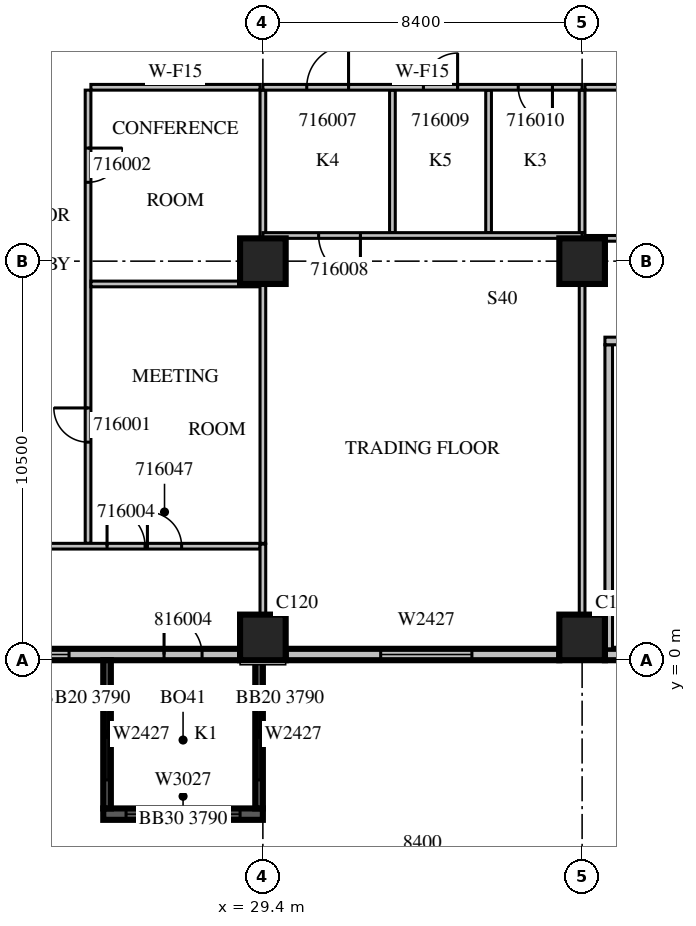
"""IFC4 building model, lengths in metres.
Left out: names, types, materials, properties, quantities, classifications, styles, units other than length and angle.
Written with IfcOpenShell. Run it as: python <this file> out.ifc"""

import sys

from ifc_helpers import new_model, si_unit, direction, frame, frame_2d, origin, origin_2d, place, context, subcontext, project, spatial, rectangle, extrude, source, transform, mapped, element, fill, save


model = new_model("IFC4")
c1 = context("Model", 3, precision=1e-05, world=origin(), true_north=direction((0.0, 1.0)))
c2 = subcontext(c1, "Body", "Model", "MODEL_VIEW")
j1 = project(units=[si_unit("LENGTHUNIT", "METRE"), si_unit("PLANEANGLEUNIT", "RADIAN")], contexts=[c1])
p1 = place(None, origin())
s1 = spatial("IfcSite", under=j1, at=p1, CompositionType="ELEMENT")
p2 = place(p1, origin())
s2 = spatial("IfcBuilding", under=s1, at=p2, CompositionType="ELEMENT")
p3 = place(p2, frame((0.0, 0.0, 78.3)))
s3 = spatial("IfcBuildingStorey", under=s2, at=p3, CompositionType="ELEMENT", Elevation=78.3)
m1 = source(origin(), c2, "Body", "SweptSolid", [
    extrude(rectangle(XDim=1.2, YDim=1.2, at=origin_2d()), origin(), (0.0, 0.0, 1.0), 4.2),
])
for number, where, z_axis, x_axis in (
    (1, (29.4, 0.6, 0.0), (0.0, 0.0, 1.0), (1.0, 0.0, 0.0)),
    (2, (37.8, 0.6, 0.0), (0.0, 0.0, 1.0), (1.0, 0.0, 0.0)),
    (3, (29.4, 10.5, 0.0), (0.0, 0.0, 1.0), (1.0, 0.0, 0.0)),
    (4, (37.8, 10.5, 0.0), (0.0, 0.0, 1.0), (1.0, 0.0, 0.0)),
):
    element("IfcColumn", number, at=place(p3, frame(where, z_axis=z_axis, x_axis=x_axis)), inside=s3, PredefinedType="COLUMN", context=c2, shape_type="MappedRepresentation", body=[
        mapped(m1, transform((0.0, 0.0, 0.0), scale=1.0)),
    ])
m2 = source(origin(), c2, "Body", "SweptSolid", [
    extrude(rectangle(XDim=7.2, YDim=0.3, at=frame_2d((3.6, 0.0))), origin(), (0.0, 0.0, 1.0), 3.8),
])
p4 = place(p3, frame((21.6, 0.15, 0.0), z_axis=(0.0, 0.0, 1.0), x_axis=(1.0, 0.0, 0.0)))
e5 = element("IfcWall", 5, at=p4, inside=s3, PredefinedType="STANDARD", context=c2, shape_type="MappedRepresentation", body=[
    mapped(m2, transform((0.0, 0.0, 0.0), scale=1.0)),
])
m3 = source(origin(), c2, "Body", "SweptSolid", [
    extrude(rectangle(XDim=2.4, YDim=2.7, at=frame_2d((1.2, 1.35))), frame((0.0, 0.16, 0.0), z_axis=(0.0, -1.0, 0.0), x_axis=(1.0, 0.0, 0.0)), (0.0, 0.0, 1.0), 0.32),
])
p5 = place(p4, frame((0.3, 0.0, 0.6)))
e6 = element("IfcOpeningElement", 6, at=p5, cuts=e5, PredefinedType="OPENING", context=c2, shape_type="MappedRepresentation", body=[
    mapped(m3, transform((0.0, 0.0, 0.0), scale=1.0)),
])
m4 = source(origin(), c2, "Body", "SweptSolid", [
    extrude(rectangle(XDim=1.0, YDim=2.1, at=frame_2d((0.5, 1.05))), frame((0.0, 0.16, 0.0), z_axis=(0.0, -1.0, 0.0), x_axis=(1.0, 0.0, 0.0)), (0.0, 0.0, 1.0), 0.32),
])
p6 = place(p4, frame((5.2, 0.0, 0.0)))
e7 = element("IfcOpeningElement", 7, at=p6, cuts=e5, PredefinedType="OPENING", context=c2, shape_type="MappedRepresentation", body=[
    mapped(m4, transform((0.0, 0.0, 0.0), scale=1.0)),
])
p7 = place(p3, frame((30.0, 0.15, 0.0), z_axis=(0.0, 0.0, 1.0), x_axis=(1.0, 0.0, 0.0)))
e8 = element("IfcWall", 8, at=p7, inside=s3, PredefinedType="STANDARD", context=c2, shape_type="MappedRepresentation", body=[
    mapped(m2, transform((0.0, 0.0, 0.0), scale=1.0)),
])
p8 = place(p7, frame((2.5, 0.0, 0.6)))
e9 = element("IfcOpeningElement", 9, at=p8, cuts=e8, PredefinedType="OPENING", context=c2, shape_type="MappedRepresentation", body=[
    mapped(m3, transform((0.0, 0.0, 0.0), scale=1.0)),
])
m5 = source(origin(), c2, "Body", "SweptSolid", [
    extrude(rectangle(XDim=1.8, YDim=0.3, at=frame_2d((0.9, 0.0))), origin(), (0.0, 0.0, 1.0), 3.8),
])
p9 = place(p3, frame((38.4, 0.15, 0.0), z_axis=(0.0, 0.0, 1.0), x_axis=(1.0, 0.0, 0.0)))
e10 = element("IfcWall", 10, at=p9, inside=s3, PredefinedType="STANDARD", context=c2, shape_type="MappedRepresentation", body=[
    mapped(m5, transform((0.0, 0.0, 0.0), scale=1.0)),
])
m6 = source(origin(), c2, "Body", "SweptSolid", [
    extrude(rectangle(XDim=4.2, YDim=0.3, at=frame_2d((2.1, 0.0))), origin(), (0.0, 0.0, 1.0), 3.79),
])
p10 = place(p3, frame((25.2, -4.05, 0.0), z_axis=(0.0, 0.0, 1.0), x_axis=(1.0, 0.0, 0.0)))
e11 = element("IfcWall", 11, at=p10, inside=s3, PredefinedType="SOLIDWALL", context=c2, shape_type="MappedRepresentation", body=[
    mapped(m6, transform((0.0, 0.0, 0.0), scale=1.0)),
])
m7 = source(origin(), c2, "Body", "SweptSolid", [
    extrude(rectangle(XDim=3.0, YDim=2.7, at=frame_2d((1.5, 1.35))), frame((0.0, 0.16, 0.0), z_axis=(0.0, -1.0, 0.0), x_axis=(1.0, 0.0, 0.0)), (0.0, 0.0, 1.0), 0.32),
])
p11 = place(p10, frame((0.6, 0.0, 0.6)))
e12 = element("IfcOpeningElement", 12, at=p11, cuts=e11, PredefinedType="OPENING", context=c2, shape_type="MappedRepresentation", body=[
    mapped(m7, transform((0.0, 0.0, 0.0), scale=1.0)),
])
m8 = source(origin(), c2, "Body", "SweptSolid", [
    extrude(rectangle(XDim=3.9, YDim=0.2, at=frame_2d((1.95, 0.0))), origin(), (0.0, 0.0, 1.0), 3.79),
])
p12 = place(p3, frame((25.3, 0.0, 0.0), z_axis=(0.0, 0.0, 1.0), x_axis=(0.0, -1.0, 0.0)))
e13 = element("IfcWall", 13, at=p12, inside=s3, PredefinedType="SOLIDWALL", context=c2, shape_type="MappedRepresentation", body=[
    mapped(m8, transform((0.0, 0.0, 0.0), scale=1.0)),
])
m9 = source(origin(), c2, "Body", "SweptSolid", [
    extrude(rectangle(XDim=2.4, YDim=2.7, at=frame_2d((1.2, 1.35))), frame((0.0, 0.11, 0.0), z_axis=(0.0, -1.0, 0.0), x_axis=(1.0, 0.0, 0.0)), (0.0, 0.0, 1.0), 0.22),
])
p13 = place(p12, frame((0.75, 0.0, 0.6)))
e14 = element("IfcOpeningElement", 14, at=p13, cuts=e13, PredefinedType="OPENING", context=c2, shape_type="MappedRepresentation", body=[
    mapped(m9, transform((0.0, 0.0, 0.0), scale=1.0)),
])
p14 = place(p3, frame((29.3, 0.0, 0.0), z_axis=(0.0, 0.0, 1.0), x_axis=(0.0, -1.0, 0.0)))
e15 = element("IfcWall", 15, at=p14, inside=s3, PredefinedType="SOLIDWALL", context=c2, shape_type="MappedRepresentation", body=[
    mapped(m8, transform((0.0, 0.0, 0.0), scale=1.0)),
])
p15 = place(p14, frame((0.75, 0.0, 0.6)))
e16 = element("IfcOpeningElement", 16, at=p15, cuts=e15, PredefinedType="OPENING", context=c2, shape_type="MappedRepresentation", body=[
    mapped(m9, transform((0.0, 0.0, 0.0), scale=1.0)),
])
m10 = source(origin(), c2, "Body", "SweptSolid", [
    extrude(rectangle(XDim=8.0, YDim=0.2, at=frame_2d((4.0, 0.0))), origin(), (0.0, 0.0, 1.0), 3.8),
])
p16 = place(p3, frame((38.5, 0.3, 0.0), z_axis=(0.0, 0.0, 1.0), x_axis=(0.0, 1.0, 0.0)))
e17 = element("IfcWall", 17, at=p16, inside=s3, PredefinedType="PARTITIONING", context=c2, shape_type="MappedRepresentation", body=[
    mapped(m10, transform((0.0, 0.0, 0.0), scale=1.0)),
])
m11 = source(origin(), c2, "Body", "SweptSolid", [
    extrude(rectangle(XDim=5.45, YDim=0.2, at=frame_2d((2.725, 0.0))), origin(), (0.0, 0.0, 1.0), 3.8),
])
p17 = place(p3, frame((38.4, 8.4, 0.0), z_axis=(0.0, 0.0, 1.0), x_axis=(1.0, 0.0, 0.0)))
e18 = element("IfcWall", 18, at=p17, inside=s3, PredefinedType="PARTITIONING", context=c2, shape_type="MappedRepresentation", body=[
    mapped(m11, transform((0.0, 0.0, 0.0), scale=1.0)),
])
m12 = source(origin(), c2, "Body", "SweptSolid", [
    extrude(rectangle(XDim=1.2, YDim=2.1, at=frame_2d((0.6, 1.05))), frame((0.0, 0.11, 0.0), z_axis=(0.0, -1.0, 0.0), x_axis=(1.0, 0.0, 0.0)), (0.0, 0.0, 1.0), 0.22),
])
p18 = place(p17, frame((0.4, 0.0, 0.0)))
e19 = element("IfcOpeningElement", 19, at=p18, cuts=e18, PredefinedType="OPENING", context=c2, shape_type="MappedRepresentation", body=[
    mapped(m12, transform((0.0, 0.0, 0.0), scale=1.0)),
])
m13 = source(origin(), c2, "Body", "SweptSolid", [
    extrude(rectangle(XDim=0.9, YDim=2.1, at=frame_2d((0.45, 1.05))), frame((0.0, 0.11, 0.0), z_axis=(0.0, -1.0, 0.0), x_axis=(1.0, 0.0, 0.0)), (0.0, 0.0, 1.0), 0.22),
])
p19 = place(p17, frame((3.25, 0.0, 0.0)))
e20 = element("IfcOpeningElement", 20, at=p19, cuts=e18, PredefinedType="OPENING", context=c2, shape_type="MappedRepresentation", body=[
    mapped(m13, transform((0.0, 0.0, 0.0), scale=1.0)),
])
m14 = source(origin(), c2, "Body", "SweptSolid", [
    extrude(rectangle(XDim=11.925, YDim=0.15, at=frame_2d((5.963, 0.0))), origin(), (0.0, 0.0, 1.0), 3.8),
])
p20 = place(p3, frame((24.8, 15.0, 0.0), z_axis=(0.0, 0.0, 1.0), x_axis=(0.0, -1.0, 0.0)))
e21 = element("IfcWall", 21, at=p20, inside=s3, PredefinedType="PARTITIONING", context=c2, shape_type="MappedRepresentation", body=[
    mapped(m14, transform((0.0, 0.0, 0.0), scale=1.0)),
])
m15 = source(origin(), c2, "Body", "SweptSolid", [
    extrude(rectangle(XDim=0.9, YDim=2.1, at=frame_2d((0.45, 1.05))), frame((0.0, 0.085, 0.0), z_axis=(0.0, -1.0, 0.0), x_axis=(1.0, 0.0, 0.0)), (0.0, 0.0, 1.0), 0.17),
])
p21 = place(p20, frame((8.363, 0.0, 0.0)))
e22 = element("IfcOpeningElement", 22, at=p21, cuts=e21, PredefinedType="OPENING", context=c2, shape_type="MappedRepresentation", body=[
    mapped(m15, transform((0.0, 0.0, 0.0), scale=1.0)),
])
p22 = place(p20, frame((1.525, 0.0, 0.0)))
e23 = element("IfcOpeningElement", 23, at=p22, cuts=e21, PredefinedType="OPENING", context=c2, shape_type="MappedRepresentation", body=[
    mapped(m15, transform((0.0, 0.0, 0.0), scale=1.0)),
])
m16 = source(origin(), c2, "Body", "SweptSolid", [
    extrude(rectangle(XDim=4.45, YDim=0.15, at=frame_2d((2.225, 0.0))), origin(), (0.0, 0.0, 1.0), 3.8),
])
for number, where, z_axis, x_axis in (
    (24, (29.325, 9.9, 0.0), (0.0, 0.0, 1.0), (-1.0, 0.0, 0.0)),
    (25, (29.325, 15.075, 0.0), (0.0, 0.0, 1.0), (-1.0, 0.0, 0.0)),
):
    element("IfcWall", number, at=place(p3, frame(where, z_axis=z_axis, x_axis=x_axis)), inside=s3, PredefinedType="PARTITIONING", context=c2, shape_type="MappedRepresentation", body=[
        mapped(m16, transform((0.0, 0.0, 0.0), scale=1.0)),
    ])
m17 = source(origin(), c2, "Body", "SweptSolid", [
    extrude(rectangle(XDim=6.826, YDim=0.15, at=frame_2d((3.413, 0.0))), origin(), (0.0, 0.0, 1.0), 3.8),
])
p23 = place(p3, frame((29.4, 3.075, 0.0), z_axis=(0.0, 0.0, 1.0), x_axis=(0.0, 1.0, 0.0)))
e26 = element("IfcWall", 26, at=p23, inside=s3, PredefinedType="PARTITIONING", context=c2, shape_type="MappedRepresentation", body=[
    mapped(m17, transform((0.0, 0.0, 0.0), scale=1.0)),
])
m18 = source(origin(), c2, "Body", "SweptSolid", [
    extrude(rectangle(XDim=3.901, YDim=0.15, at=frame_2d((1.95, 0.0))), origin(), (0.0, 0.0, 1.0), 3.8),
])
p24 = place(p3, frame((29.4, 11.099, 0.0), z_axis=(0.0, 0.0, 1.0), x_axis=(0.0, 1.0, 0.0)))
e27 = element("IfcWall", 27, at=p24, inside=s3, PredefinedType="PARTITIONING", context=c2, shape_type="MappedRepresentation", body=[
    mapped(m18, transform((0.0, 0.0, 0.0), scale=1.0)),
])
m19 = source(origin(), c2, "Body", "SweptSolid", [
    extrude(rectangle(XDim=7.125, YDim=0.15, at=frame_2d((3.562, 0.0))), origin(), (0.0, 0.0, 1.0), 3.8),
])
p25 = place(p3, frame((22.2, 3.0, 0.0), z_axis=(0.0, 0.0, 1.0), x_axis=(1.0, 0.0, 0.0)))
e28 = element("IfcWall", 28, at=p25, inside=s3, PredefinedType="PARTITIONING", context=c2, shape_type="MappedRepresentation", body=[
    mapped(m19, transform((0.0, 0.0, 0.0), scale=1.0)),
])
m20 = source(origin(), c2, "Body", "SweptSolid", [
    extrude(rectangle(XDim=1.0, YDim=2.1, at=frame_2d((0.5, 1.05))), frame((0.0, 0.085, 0.0), z_axis=(0.0, -1.0, 0.0), x_axis=(1.0, 0.0, 0.0)), (0.0, 0.0, 1.0), 0.17),
])
p26 = place(p25, frame((3.1, 0.0, 0.0)))
e29 = element("IfcOpeningElement", 29, at=p26, cuts=e28, PredefinedType="OPENING", context=c2, shape_type="MappedRepresentation", body=[
    mapped(m20, transform((0.0, 0.0, 0.0), scale=1.0)),
])
p27 = place(p25, frame((4.162, 0.0, 0.0)))
e30 = element("IfcOpeningElement", 30, at=p27, cuts=e28, PredefinedType="OPENING", context=c2, shape_type="MappedRepresentation", body=[
    mapped(m15, transform((0.0, 0.0, 0.0), scale=1.0)),
])
m21 = source(origin(), c2, "Body", "SweptSolid", [
    extrude(rectangle(XDim=6.45, YDim=0.15, at=frame_2d((3.225, 0.0))), origin(), (0.0, 0.0, 1.0), 3.8),
])
p28 = place(p3, frame((37.875, 11.1, 0.0), z_axis=(0.0, 0.0, 1.0), x_axis=(1.0, 0.0, 0.0)))
e31 = element("IfcWall", 31, at=p28, inside=s3, PredefinedType="PARTITIONING", context=c2, shape_type="MappedRepresentation", body=[
    mapped(m21, transform((0.0, 0.0, 0.0), scale=1.0)),
])
p29 = place(p3, frame((44.325, 15.075, 0.0), z_axis=(0.0, 0.0, 1.0), x_axis=(-1.0, 0.0, 0.0)))
e32 = element("IfcWall", 32, at=p29, inside=s3, PredefinedType="PARTITIONING", context=c2, shape_type="MappedRepresentation", body=[
    mapped(m21, transform((0.0, 0.0, 0.0), scale=1.0)),
])
p30 = place(p29, frame((2.812, 0.0, 0.0)))
e33 = element("IfcOpeningElement", 33, at=p30, cuts=e32, PredefinedType="OPENING", context=c2, shape_type="MappedRepresentation", body=[
    mapped(m15, transform((0.0, 0.0, 0.0), scale=1.0)),
])
m22 = source(origin(), c2, "Body", "SweptSolid", [
    extrude(rectangle(XDim=3.75, YDim=0.15, at=frame_2d((1.875, 0.0))), origin(), (0.0, 0.0, 1.0), 3.8),
])
for number, where, z_axis, x_axis in (
    (34, (32.809, 11.25, 0.0), (0.0, 0.0, 1.0), (0.0, 1.0, 0.0)),
    (35, (35.339, 11.25, 0.0), (0.0, 0.0, 1.0), (0.0, 1.0, 0.0)),
):
    element("IfcWall", number, at=place(p3, frame(where, z_axis=z_axis, x_axis=x_axis)), inside=s3, PredefinedType="PARTITIONING", context=c2, shape_type="MappedRepresentation", body=[
        mapped(m22, transform((0.0, 0.0, 0.0), scale=1.0)),
    ])
m23 = source(origin(), c2, "Body", "SweptSolid", [
    extrude(rectangle(XDim=1.856, YDim=0.15, at=frame_2d((0.928, 0.0))), origin(), (0.0, 0.0, 1.0), 3.8),
])
p31 = place(p3, frame((29.4, 1.199, 0.0), z_axis=(0.0, 0.0, 1.0), x_axis=(0.0, 1.0, 0.0)))
e36 = element("IfcWall", 36, at=p31, inside=s3, PredefinedType="PARTITIONING", context=c2, shape_type="MappedRepresentation", body=[
    mapped(m23, transform((0.0, 0.0, 0.0), scale=1.0)),
])
m24 = source(origin(), c2, "Body", "SweptSolid", [
    extrude(rectangle(XDim=8.702, YDim=0.15, at=frame_2d((4.351, 0.0))), origin(), (0.0, 0.0, 1.0), 3.8),
])
p32 = place(p3, frame((37.8, 1.199, 0.0), z_axis=(0.0, 0.0, 1.0), x_axis=(0.0, 1.0, 0.0)))
e37 = element("IfcWall", 37, at=p32, inside=s3, PredefinedType="PARTITIONING", context=c2, shape_type="MappedRepresentation", body=[
    mapped(m24, transform((0.0, 0.0, 0.0), scale=1.0)),
])
p33 = place(p3, frame((37.8, 11.25, 0.0), z_axis=(0.0, 0.0, 1.0), x_axis=(0.0, 1.0, 0.0)))
e38 = element("IfcWall", 38, at=p33, inside=s3, PredefinedType="PARTITIONING", context=c2, shape_type="MappedRepresentation", body=[
    mapped(m22, transform((0.0, 0.0, 0.0), scale=1.0)),
])
m25 = source(origin(), c2, "Body", "SweptSolid", [
    extrude(rectangle(XDim=8.4, YDim=0.15, at=frame_2d((4.2, 0.0))), origin(), (0.0, 0.0, 1.0), 3.8),
])
p34 = place(p3, frame((37.8, 11.175, 0.0), z_axis=(0.0, 0.0, 1.0), x_axis=(-1.0, 0.0, 0.0)))
e39 = element("IfcWall", 39, at=p34, inside=s3, PredefinedType="PARTITIONING", context=c2, shape_type="MappedRepresentation", body=[
    mapped(m25, transform((0.0, 0.0, 0.0), scale=1.0)),
])
m26 = source(origin(), c2, "Body", "SweptSolid", [
    extrude(rectangle(XDim=1.1, YDim=2.1, at=frame_2d((0.55, 1.05))), frame((0.0, 0.085, 0.0), z_axis=(0.0, -1.0, 0.0), x_axis=(1.0, 0.0, 0.0)), (0.0, 0.0, 1.0), 0.17),
])
p35 = place(p34, frame((5.833, 0.0, 0.0)))
e40 = element("IfcOpeningElement", 40, at=p35, cuts=e39, PredefinedType="OPENING", context=c2, shape_type="MappedRepresentation", body=[
    mapped(m26, transform((0.0, 0.0, 0.0), scale=1.0)),
])
p36 = place(p3, frame((37.8, 15.075, 0.0), z_axis=(0.0, 0.0, 1.0), x_axis=(-1.0, 0.0, 0.0)))
e41 = element("IfcWall", 41, at=p36, inside=s3, PredefinedType="PARTITIONING", context=c2, shape_type="MappedRepresentation", body=[
    mapped(m25, transform((0.0, 0.0, 0.0), scale=1.0)),
])
p37 = place(p36, frame((6.146, 0.0, 0.0)))
e42 = element("IfcOpeningElement", 42, at=p37, cuts=e41, PredefinedType="OPENING", context=c2, shape_type="MappedRepresentation", body=[
    mapped(m26, transform((0.0, 0.0, 0.0), scale=1.0)),
])
p38 = place(p36, frame((3.276, 0.0, 0.0)))
e43 = element("IfcOpeningElement", 43, at=p38, cuts=e41, PredefinedType="OPENING", context=c2, shape_type="MappedRepresentation", body=[
    mapped(m15, transform((0.0, 0.0, 0.0), scale=1.0)),
])
p39 = place(p36, frame((0.781, 0.0, 0.0)))
e44 = element("IfcOpeningElement", 44, at=p39, cuts=e41, PredefinedType="OPENING", context=c2, shape_type="MappedRepresentation", body=[
    mapped(m15, transform((0.0, 0.0, 0.0), scale=1.0)),
])
m27 = source(origin(), c2, "Body", "SweptSolid", [
    extrude(rectangle(XDim=2.4, YDim=2.7, at=frame_2d((1.2, 1.35))), frame((0.0, 0.03, 0.0), z_axis=(0.0, -1.0, 0.0), x_axis=(1.0, 0.0, 0.0)), (0.0, 0.0, 1.0), 0.06),
])
p40 = place(p5, origin())
e45 = element("IfcWindow", 45, at=p40, inside=s3, PartitioningType="SINGLE_PANEL", PredefinedType="WINDOW", context=c2, shape_type="MappedRepresentation", body=[
    mapped(m27, transform((0.0, 0.0, 0.0), scale=1.0)),
])
fill(e6, e45)
p41 = place(p8, origin())
e46 = element("IfcWindow", 46, at=p41, inside=s3, PartitioningType="SINGLE_PANEL", PredefinedType="WINDOW", context=c2, shape_type="MappedRepresentation", body=[
    mapped(m27, transform((0.0, 0.0, 0.0), scale=1.0)),
])
fill(e9, e46)
m28 = source(origin(), c2, "Body", "SweptSolid", [
    extrude(rectangle(XDim=3.0, YDim=2.7, at=frame_2d((1.5, 1.35))), frame((0.0, 0.03, 0.0), z_axis=(0.0, -1.0, 0.0), x_axis=(1.0, 0.0, 0.0)), (0.0, 0.0, 1.0), 0.06),
])
p42 = place(p11, origin())
e47 = element("IfcWindow", 47, at=p42, inside=s3, PartitioningType="SINGLE_PANEL", PredefinedType="WINDOW", context=c2, shape_type="MappedRepresentation", body=[
    mapped(m28, transform((0.0, 0.0, 0.0), scale=1.0)),
])
fill(e12, e47)
p43 = place(p13, origin())
e48 = element("IfcWindow", 48, at=p43, inside=s3, PartitioningType="SINGLE_PANEL", PredefinedType="WINDOW", context=c2, shape_type="MappedRepresentation", body=[
    mapped(m27, transform((0.0, 0.0, 0.0), scale=1.0)),
])
fill(e14, e48)
p44 = place(p15, origin())
e49 = element("IfcWindow", 49, at=p44, inside=s3, PartitioningType="SINGLE_PANEL", PredefinedType="WINDOW", context=c2, shape_type="MappedRepresentation", body=[
    mapped(m27, transform((0.0, 0.0, 0.0), scale=1.0)),
])
fill(e16, e49)
m29 = source(origin(), c2, "Body", "SweptSolid", [
    extrude(rectangle(XDim=0.9, YDim=2.1, at=frame_2d((0.45, 1.05))), frame((0.0, 0.025, 0.0), z_axis=(0.0, -1.0, 0.0), x_axis=(1.0, 0.0, 0.0)), (0.0, 0.0, 1.0), 0.05),
])
p45 = place(p21, origin())
e50 = element("IfcDoor", 50, at=p45, inside=s3, OperationType="SINGLE_SWING_RIGHT", PredefinedType="DOOR", context=c2, shape_type="MappedRepresentation", body=[
    mapped(m29, transform((0.0, 0.0, 0.0), scale=1.0)),
])
fill(e22, e50)
p46 = place(p22, origin())
e51 = element("IfcDoor", 51, at=p46, inside=s3, OperationType="SINGLE_SWING_LEFT", PredefinedType="DOOR", context=c2, shape_type="MappedRepresentation", body=[
    mapped(m29, transform((0.0, 0.0, 0.0), scale=1.0)),
])
fill(e23, e51)
m30 = source(origin(), c2, "Body", "SweptSolid", [
    extrude(rectangle(XDim=1.0, YDim=2.1, at=frame_2d((0.5, 1.05))), frame((0.0, 0.025, 0.0), z_axis=(0.0, -1.0, 0.0), x_axis=(1.0, 0.0, 0.0)), (0.0, 0.0, 1.0), 0.05),
])
p47 = place(p26, origin())
e52 = element("IfcDoor", 52, at=p47, inside=s3, OperationType="SINGLE_SWING_LEFT", PredefinedType="DOOR", context=c2, shape_type="MappedRepresentation", body=[
    mapped(m30, transform((0.0, 0.0, 0.0), scale=1.0)),
])
fill(e29, e52)
m31 = source(origin(), c2, "Body", "SweptSolid", [
    extrude(rectangle(XDim=1.1, YDim=2.1, at=frame_2d((0.55, 1.05))), frame((0.0, 0.025, 0.0), z_axis=(0.0, -1.0, 0.0), x_axis=(1.0, 0.0, 0.0)), (0.0, 0.0, 1.0), 0.05),
])
p48 = place(p37, origin())
e53 = element("IfcDoor", 53, at=p48, inside=s3, OperationType="SINGLE_SWING_RIGHT", PredefinedType="DOOR", context=c2, shape_type="MappedRepresentation", body=[
    mapped(m31, transform((0.0, 0.0, 0.0), scale=1.0)),
])
fill(e42, e53)
p49 = place(p35, origin())
e54 = element("IfcDoor", 54, at=p49, inside=s3, OperationType="SINGLE_SWING_LEFT", PredefinedType="DOOR", context=c2, shape_type="MappedRepresentation", body=[
    mapped(m31, transform((0.0, 0.0, 0.0), scale=1.0)),
])
fill(e40, e54)
p50 = place(p38, origin())
e55 = element("IfcDoor", 55, at=p50, inside=s3, OperationType="SINGLE_SWING_RIGHT", PredefinedType="DOOR", context=c2, shape_type="MappedRepresentation", body=[
    mapped(m29, transform((0.0, 0.0, 0.0), scale=1.0)),
])
fill(e43, e55)
p51 = place(p39, origin())
e56 = element("IfcDoor", 56, at=p51, inside=s3, OperationType="SINGLE_SWING_LEFT", PredefinedType="DOOR", context=c2, shape_type="MappedRepresentation", body=[
    mapped(m29, transform((0.0, 0.0, 0.0), scale=1.0)),
])
fill(e44, e56)
p52 = place(p27, origin())
e57 = element("IfcDoor", 57, at=p52, inside=s3, OperationType="SINGLE_SWING_LEFT", PredefinedType="DOOR", context=c2, shape_type="MappedRepresentation", body=[
    mapped(m29, transform((0.0, 0.0, 0.0), scale=1.0)),
])
fill(e30, e57)
p53 = place(p6, origin())
e58 = element("IfcDoor", 58, at=p53, inside=s3, OperationType="SINGLE_SWING_LEFT", PredefinedType="DOOR", context=c2, shape_type="MappedRepresentation", body=[
    mapped(m30, transform((0.0, 0.0, 0.0), scale=1.0)),
])
fill(e7, e58)
save(model, sys.argv[1])
